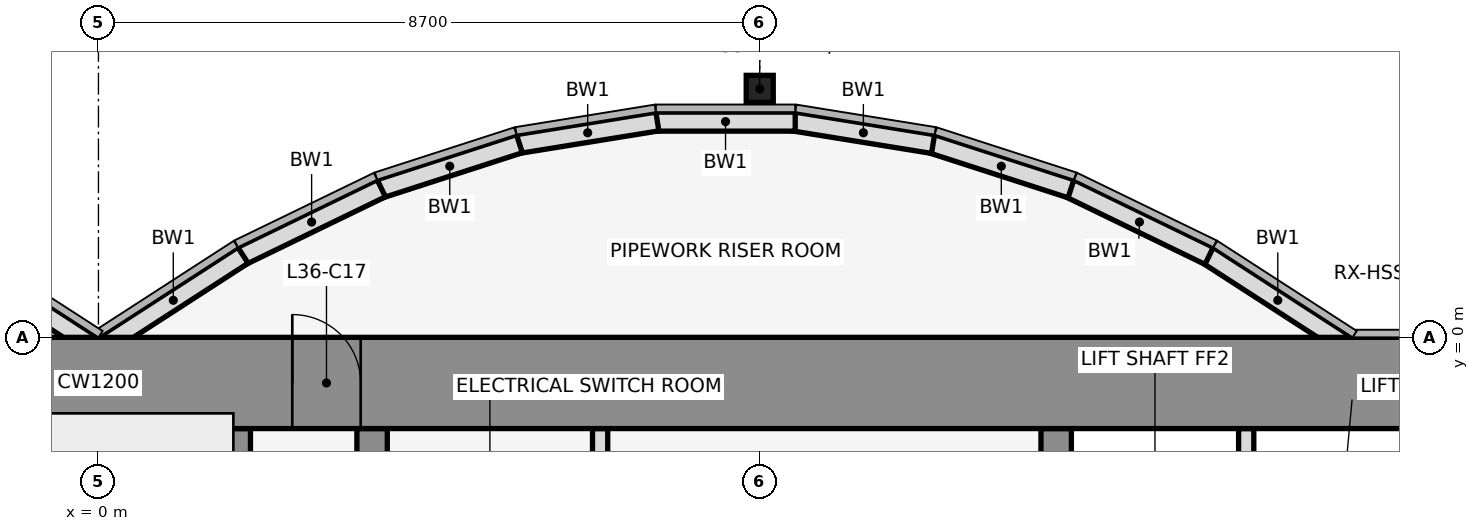
"""IFC4 building model, lengths in metres.
Left out: names, types, materials, properties, quantities, classifications, styles, units other than length and angle.
Written with IfcOpenShell. Run it as: python <this file> out.ifc"""

import sys

from ifc_helpers import new_model, si_unit, direction, frame, frame_2d, origin, origin_2d, place, context, subcontext, project, spatial, rectangle, hollow_rectangle, extrude, element, fill, save


model = new_model("IFC4")
c1 = context("Model", 3, precision=1e-05, world=origin(), true_north=direction((0.0, 1.0)))
c2 = subcontext(c1, "Body", "Model", "MODEL_VIEW")
j1 = project(units=[si_unit("LENGTHUNIT", "METRE"), si_unit("PLANEANGLEUNIT", "RADIAN")], contexts=[c1])
p1 = place(None, origin())
s1 = spatial("IfcSite", under=j1, at=p1, CompositionType="ELEMENT")
p2 = place(p1, origin())
s2 = spatial("IfcBuilding", under=s1, at=p2, CompositionType="ELEMENT")
p3 = place(p2, frame((0.0, 0.0, 165.0)))
s3 = spatial("IfcBuildingStorey", under=s2, at=p3, CompositionType="ELEMENT", Elevation=165.0)
p4 = place(p3, frame((8.7, 3.269, 0.0), z_axis=(0.0, 0.0, 1.0), x_axis=(1.0, 0.0, 0.0)))
e1 = element("IfcColumn", 1, at=p4, inside=s3, PredefinedType="COLUMN", context=c2, shape_type="SweptSolid", body=[
    extrude(hollow_rectangle(XDim=0.356, YDim=0.356, WallThickness=0.012, at=origin_2d()), origin(), (0.0, 0.0, 1.0), 4.1),
])
p5 = place(p3, frame((16.432, -0.105, 0.0), z_axis=(0.0, 0.0, 1.0), x_axis=(-0.83981312244, 0.542875602121, 0.0)))
e2 = element("IfcWall", 2, at=p5, inside=s3, PredefinedType="STANDARD", context=c2, shape_type="SweptSolid", body=[
    extrude(rectangle(XDim=2.183, YDim=0.25, at=frame_2d((1.091, 0.0))), origin(), (0.0, 0.0, 1.0), 3.95),
])
p6 = place(p3, frame((14.612, 1.073, 0.0), z_axis=(0.0, 0.0, 1.0), x_axis=(-0.89982408427, 0.436252928206, 0.0)))
e3 = element("IfcWall", 3, at=p6, inside=s3, PredefinedType="STANDARD", context=c2, shape_type="SweptSolid", body=[
    extrude(rectangle(XDim=2.038, YDim=0.25, at=frame_2d((1.019, 0.0))), origin(), (0.0, 0.0, 1.0), 3.95),
])
p7 = place(p3, frame((12.795, 1.955, 0.0), z_axis=(0.0, 0.0, 1.0), x_axis=(-0.951495806175, 0.307661714928, 0.0)))
e4 = element("IfcWall", 4, at=p7, inside=s3, PredefinedType="STANDARD", context=c2, shape_type="SweptSolid", body=[
    extrude(rectangle(XDim=1.927, YDim=0.25, at=frame_2d((0.963, 0.0))), origin(), (0.0, 0.0, 1.0), 3.95),
])
p8 = place(p3, frame((10.98, 2.543, 0.0), z_axis=(0.0, 0.0, 1.0), x_axis=(-0.987181718931, 0.159600293885, 0.0)))
e5 = element("IfcWall", 5, at=p8, inside=s3, PredefinedType="STANDARD", context=c2, shape_type="SweptSolid", body=[
    extrude(rectangle(XDim=1.857, YDim=0.25, at=frame_2d((0.929, 0.0))), origin(), (0.0, 0.0, 1.0), 3.95),
])
p9 = place(p3, frame((9.167, 2.838, 0.0), z_axis=(0.0, 0.0, 1.0), x_axis=(-1.0, 0.0, 0.0)))
e6 = element("IfcWall", 6, at=p9, inside=s3, PredefinedType="STANDARD", context=c2, shape_type="SweptSolid", body=[
    extrude(rectangle(XDim=1.833, YDim=0.25, at=frame_2d((0.917, 0.0))), origin(), (0.0, 0.0, 1.0), 3.95),
])
p10 = place(p3, frame((7.353, 2.84, 0.0), z_axis=(0.0, 0.0, 1.0), x_axis=(-0.987181718931, -0.159600293885, 0.0)))
e7 = element("IfcWall", 7, at=p10, inside=s3, PredefinedType="STANDARD", context=c2, shape_type="SweptSolid", body=[
    extrude(rectangle(XDim=1.857, YDim=0.25, at=frame_2d((0.929, 0.0))), origin(), (0.0, 0.0, 1.0), 3.95),
])
p11 = place(p3, frame((5.538, 2.548, 0.0), z_axis=(0.0, 0.0, 1.0), x_axis=(-0.951495806175, -0.307661714928, 0.0)))
e8 = element("IfcWall", 8, at=p11, inside=s3, PredefinedType="STANDARD", context=c2, shape_type="SweptSolid", body=[
    extrude(rectangle(XDim=1.927, YDim=0.25, at=frame_2d((0.963, 0.0))), origin(), (0.0, 0.0, 1.0), 3.95),
])
p12 = place(p3, frame((3.721, 1.962, 0.0), z_axis=(0.0, 0.0, 1.0), x_axis=(-0.89982408427, -0.436252928206, 0.0)))
e9 = element("IfcWall", 9, at=p12, inside=s3, PredefinedType="STANDARD", context=c2, shape_type="SweptSolid", body=[
    extrude(rectangle(XDim=2.038, YDim=0.25, at=frame_2d((1.019, 0.0))), origin(), (0.0, 0.0, 1.0), 3.95),
])
for number, where, z_axis, x_axis in (
    (10, (1.901, 1.08, 0.0), (0.0, 0.0, 1.0), (-0.84, -0.543, 0.0)),
    (11, (-0.068, -0.105, 0.0), (0.0, 0.0, 1.0), (-0.84, 0.543, 0.0)),
):
    element("IfcWall", number, at=place(p3, frame(where, z_axis=z_axis, x_axis=x_axis)), inside=s3, PredefinedType="STANDARD", context=c2, shape_type="SweptSolid", body=[
        extrude(rectangle(XDim=2.183, YDim=0.25, at=frame_2d((1.091, 0.0))), origin(), (0.0, 0.0, 1.0), 3.95),
    ])
p13 = place(p3, frame((1.8, -11.8, 0.0), z_axis=(0.0, 0.0, 1.0), x_axis=(0.0, 1.0, 0.0)))
e12 = element("IfcWall", 12, at=p13, inside=s3, PredefinedType="SHEAR", context=c2, shape_type="SweptSolid", body=[
    extrude(rectangle(XDim=10.6, YDim=0.4, at=frame_2d((5.3, 0.0))), origin(), (0.0, 0.0, 1.0), 4.1),
])
p14 = place(p3, frame((3.6, -11.8, 0.0), z_axis=(0.0, 0.0, 1.0), x_axis=(0.0, 1.0, 0.0)))
e13 = element("IfcWall", 13, at=p14, inside=s3, PredefinedType="SHEAR", context=c2, shape_type="SweptSolid", body=[
    extrude(rectangle(XDim=10.6, YDim=0.4, at=frame_2d((5.3, 0.0))), origin(), (0.0, 0.0, 1.0), 4.1),
])
p15 = place(p14, frame((1.35, 0.0, 0.0)))
e14 = element("IfcOpeningElement", 14, at=p15, cuts=e13, PredefinedType="OPENING", context=c2, shape_type="SweptSolid", body=[
    extrude(rectangle(XDim=0.9, YDim=2.1, at=frame_2d((0.45, 1.05))), frame((0.0, 0.212, 0.0), z_axis=(0.0, -1.0, 0.0), x_axis=(1.0, 0.0, 0.0)), (0.0, 0.0, 1.0), 0.424),
])
p16 = place(p3, frame((6.6, -4.6, 0.0), z_axis=(0.0, 0.0, 1.0), x_axis=(0.0, 1.0, 0.0)))
e15 = element("IfcWall", 15, at=p16, inside=s3, PredefinedType="PARTITIONING", context=c2, shape_type="SweptSolid", body=[
    extrude(rectangle(XDim=3.4, YDim=0.2, at=frame_2d((1.7, 0.0))), origin(), (0.0, 0.0, 1.0), 2.84),
])
p17 = place(p3, frame((12.6, -11.8, 0.0), z_axis=(0.0, 0.0, 1.0), x_axis=(0.0, 1.0, 0.0)))
e16 = element("IfcWall", 16, at=p17, inside=s3, PredefinedType="SHEAR", context=c2, shape_type="SweptSolid", body=[
    extrude(rectangle(XDim=10.6, YDim=0.4, at=frame_2d((5.3, 0.0))), origin(), (0.0, 0.0, 1.0), 4.1),
])
p18 = place(p17, frame((1.25, 0.0, 0.0)))
e17 = element("IfcOpeningElement", 17, at=p18, cuts=e16, PredefinedType="OPENING", context=c2, shape_type="SweptSolid", body=[
    extrude(rectangle(XDim=1.2, YDim=2.1, at=frame_2d((0.6, 1.05))), frame((0.0, 0.212, 0.0), z_axis=(0.0, -1.0, 0.0), x_axis=(1.0, 0.0, 0.0)), (0.0, 0.0, 1.0), 0.424),
])
p19 = place(p17, frame((4.75, 0.0, 0.0)))
e18 = element("IfcOpeningElement", 18, at=p19, cuts=e16, PredefinedType="OPENING", context=c2, shape_type="SweptSolid", body=[
    extrude(rectangle(XDim=1.1, YDim=2.1, at=frame_2d((0.55, 1.05))), frame((0.0, 0.212, 0.0), z_axis=(0.0, -1.0, 0.0), x_axis=(1.0, 0.0, 0.0)), (0.0, 0.0, 1.0), 0.424),
])
p20 = place(p3, frame((15.1, -4.6, 0.0), z_axis=(0.0, 0.0, 1.0), x_axis=(0.0, 1.0, 0.0)))
e19 = element("IfcWall", 19, at=p20, inside=s3, PredefinedType="PARTITIONING", context=c2, shape_type="SweptSolid", body=[
    extrude(rectangle(XDim=3.4, YDim=0.2, at=frame_2d((1.7, 0.0))), origin(), (0.0, 0.0, 1.0), 2.84),
])
p21 = place(p3, frame((-22.0, -0.6, 0.0), z_axis=(0.0, 0.0, 1.0), x_axis=(1.0, 0.0, 0.0)))
e20 = element("IfcWall", 20, at=p21, inside=s3, PredefinedType="SHEAR", context=c2, shape_type="SweptSolid", body=[
    extrude(rectangle(XDim=44.0, YDim=1.2, at=frame_2d((22.0, 0.0))), origin(), (0.0, 0.0, 1.0), 4.1),
])
p22 = place(p21, frame((18.55, 0.0, 0.0)))
e21 = element("IfcOpeningElement", 21, at=p22, cuts=e20, PredefinedType="OPENING", context=c2, shape_type="SweptSolid", body=[
    extrude(rectangle(XDim=0.9, YDim=2.1, at=frame_2d((0.45, 1.05))), frame((0.0, 0.612, 0.0), z_axis=(0.0, -1.0, 0.0), x_axis=(1.0, 0.0, 0.0)), (0.0, 0.0, 1.0), 1.224),
])
p23 = place(p21, frame((24.55, 0.0, 0.0)))
e22 = element("IfcOpeningElement", 22, at=p23, cuts=e20, PredefinedType="OPENING", context=c2, shape_type="SweptSolid", body=[
    extrude(rectangle(XDim=0.9, YDim=2.1, at=frame_2d((0.45, 1.05))), frame((0.0, 0.612, 0.0), z_axis=(0.0, -1.0, 0.0), x_axis=(1.0, 0.0, 0.0)), (0.0, 0.0, 1.0), 1.224),
])
p24 = place(p23, origin())
e23 = element("IfcDoor", 23, at=p24, inside=s3, OperationType="SINGLE_SWING_LEFT", PredefinedType="DOOR", context=c2, shape_type="SweptSolid", body=[
    extrude(rectangle(XDim=0.9, YDim=2.1, at=frame_2d((0.45, 1.05))), frame((0.0, 0.025, 0.0), z_axis=(0.0, -1.0, 0.0), x_axis=(1.0, 0.0, 0.0)), (0.0, 0.0, 1.0), 0.05),
])
fill(e22, e23)
save(model, sys.argv[1])
